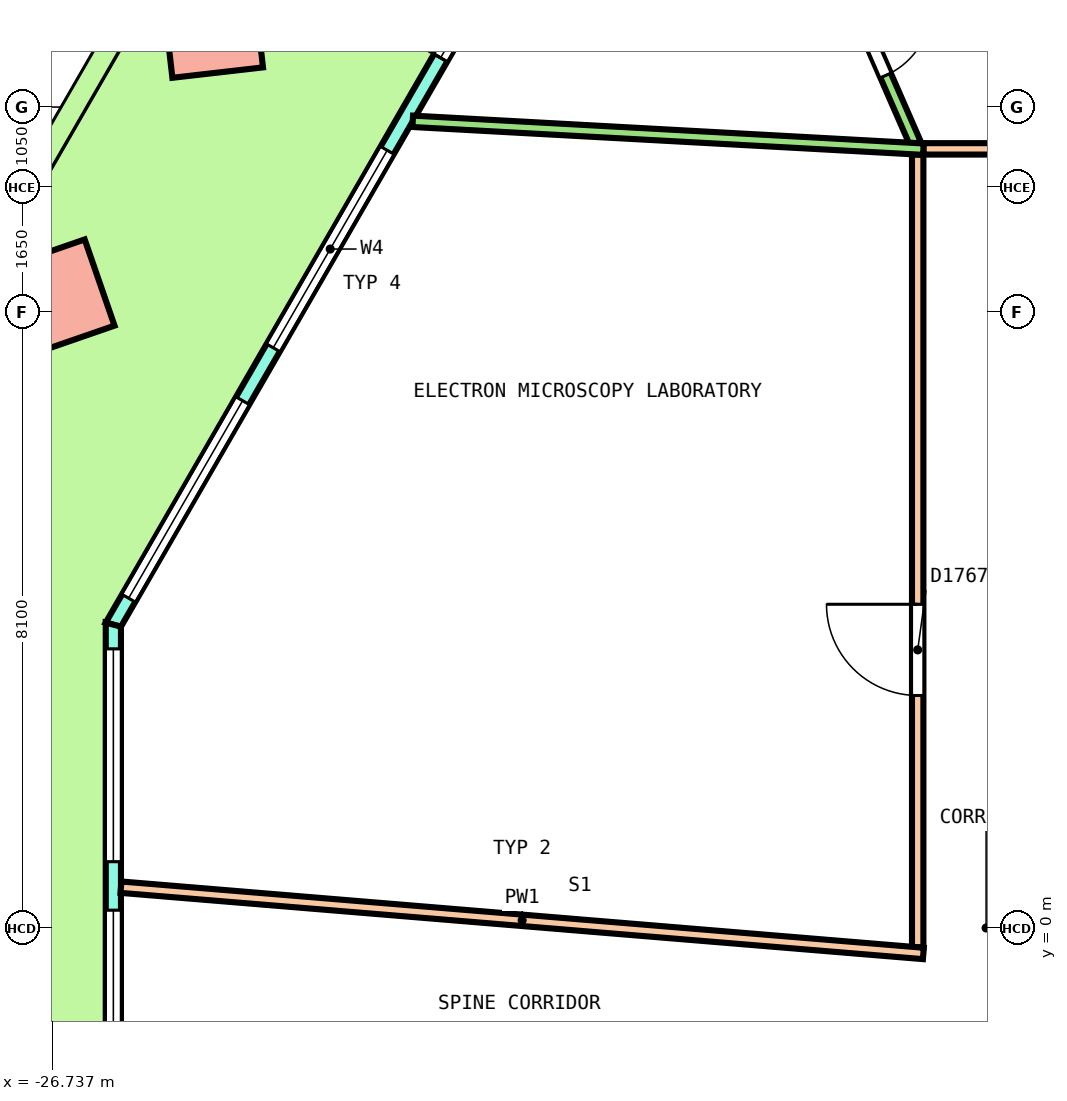
"""IFC4 building model, lengths in metres.
Left out: names, types, materials, properties, quantities, classifications, styles, units other than length and angle.
Written with IfcOpenShell. Run it as: python <this file> out.ifc"""

import sys

from ifc_helpers import new_model, si_unit, direction, frame, frame_2d, origin, origin_2d, place, context, subcontext, project, spatial, polyline, rectangle, outline, extrude, element, fill, save


model = new_model("IFC4")
c1 = context("Model", 3, precision=1e-05, world=origin(), true_north=direction((0.0, 1.0)))
c2 = subcontext(c1, "Body", "Model", "MODEL_VIEW")
j1 = project(units=[si_unit("LENGTHUNIT", "METRE"), si_unit("PLANEANGLEUNIT", "RADIAN")], contexts=[c1])
p1 = place(None, origin())
s1 = spatial("IfcSite", under=j1, at=p1, CompositionType="ELEMENT")
p2 = place(p1, origin())
s2 = spatial("IfcBuilding", under=s1, at=p2, CompositionType="ELEMENT")
p3 = place(p2, frame((0.0, 0.0, 162.8)))
s3 = spatial("IfcBuildingStorey", under=s2, at=p3, CompositionType="ELEMENT", Elevation=162.8)
p4 = place(p3, frame((-24.628, 11.849, 0.0), z_axis=(-0.025365582388, 0.018858497119, 0.999500347332), x_axis=(-0.501191337303, -0.865328971352, 0.0036075963)))
e1 = element("IfcColumn", 1, at=p4, inside=s3, PredefinedType="COLUMN", context=c2, shape_type="SweptSolid", body=[
    extrude(rectangle(XDim=1.2, YDim=1.2, at=origin_2d()), origin(), (0.0, 0.0, 1.0), 4.052),
])
p5 = place(p3, frame((-26.68, 8.295, 0.0), z_axis=(-0.021809609218, 0.025123223878, 0.999446429063), x_axis=(-0.499316957517, -0.86635106376, 0.010881647777)))
e2 = element("IfcColumn", 2, at=p5, inside=s3, PredefinedType="COLUMN", context=c2, shape_type="SweptSolid", body=[
    extrude(rectangle(XDim=1.2, YDim=1.2, at=origin_2d()), origin(), (0.0, 0.0, 1.0), 4.052),
])
p6 = place(p3, frame((-16.422, 20.463, 0.0), z_axis=(0.0, 0.0, 1.0), x_axis=(-0.500001707189, -0.866024418136, 0.0)))
e3 = element("IfcWall", 3, at=p6, inside=s3, PredefinedType="SOLIDWALL", context=c2, shape_type="SweptSolid", body=[
    extrude(outline(polyline([(-0.027, -0.1), (0.977, -0.1), (1.981, -0.1), (2.985, -0.1), (3.989, -0.1), (4.993, -0.1), (5.997, -0.1), (7.0, -0.1), (8.004, -0.1), (9.008, -0.1), (10.012, -0.1), (11.016, -0.1), (12.02, -0.1), (13.024, -0.1), (14.028, -0.1), (15.032, -0.1), (16.036, -0.1), (17.04, -0.1), (18.043, -0.1), (19.047, -0.1), (18.994, 0.1), (17.995, 0.1), (16.997, 0.1), (15.999, 0.1), (15.001, 0.1), (14.002, 0.1), (13.004, 0.1), (12.006, 0.1), (11.008, 0.1), (10.009, 0.1), (9.011, 0.1), (8.013, 0.1), (7.015, 0.1), (6.016, 0.1), (5.018, 0.1), (4.02, 0.1), (3.022, 0.1), (2.023, 0.1), (1.025, 0.1), (0.027, 0.1), (-0.027, -0.1)])), origin(), (0.0, 0.0, 1.0), 4.1),
])
p7 = place(p6, frame((0.402, 0.0, 0.1)))
e4 = element("IfcOpeningElement", 4, at=p7, cuts=e3, PredefinedType="OPENING", context=c2, shape_type="SweptSolid", body=[
    extrude(rectangle(XDim=3.0, YDim=2.9, at=frame_2d((1.5, 1.45))), frame((0.0, 0.11, 0.0), z_axis=(0.0, -1.0, 0.0), x_axis=(1.0, 0.0, 0.0)), (0.0, 0.0, 1.0), 0.22),
])
p8 = place(p6, frame((4.206, 0.0, 0.1)))
e5 = element("IfcOpeningElement", 5, at=p8, cuts=e3, PredefinedType="OPENING", context=c2, shape_type="SweptSolid", body=[
    extrude(rectangle(XDim=3.0, YDim=2.9, at=frame_2d((1.5, 1.45))), frame((0.0, 0.11, 0.0), z_axis=(0.0, -1.0, 0.0), x_axis=(1.0, 0.0, 0.0)), (0.0, 0.0, 1.0), 0.22),
])
p9 = place(p6, frame((8.61, 0.0, 0.0)))
e6 = element("IfcOpeningElement", 6, at=p9, cuts=e3, PredefinedType="OPENING", context=c2, shape_type="SweptSolid", body=[
    extrude(rectangle(XDim=1.8, YDim=2.4, at=frame_2d((0.9, 1.2))), frame((0.0, 0.11, 0.0), z_axis=(0.0, -1.0, 0.0), x_axis=(1.0, 0.0, 0.0)), (0.0, 0.0, 1.0), 0.22),
])
p10 = place(p6, frame((8.61, 0.0, 2.55)))
e7 = element("IfcOpeningElement", 7, at=p10, cuts=e3, PredefinedType="OPENING", context=c2, shape_type="SweptSolid", body=[
    extrude(rectangle(XDim=1.8, YDim=0.45, at=frame_2d((0.9, 0.225))), frame((0.0, 0.11, 0.0), z_axis=(0.0, -1.0, 0.0), x_axis=(1.0, 0.0, 0.0)), (0.0, 0.0, 1.0), 0.22),
])
p11 = place(p6, frame((11.814, 0.0, 0.1)))
e8 = element("IfcOpeningElement", 8, at=p11, cuts=e3, PredefinedType="OPENING", context=c2, shape_type="SweptSolid", body=[
    extrude(rectangle(XDim=3.0, YDim=2.9, at=frame_2d((1.5, 1.45))), frame((0.0, 0.11, 0.0), z_axis=(0.0, -1.0, 0.0), x_axis=(1.0, 0.0, 0.0)), (0.0, 0.0, 1.0), 0.22),
])
p12 = place(p6, frame((15.618, 0.0, 0.1)))
e9 = element("IfcOpeningElement", 9, at=p12, cuts=e3, PredefinedType="OPENING", context=c2, shape_type="SweptSolid", body=[
    extrude(rectangle(XDim=3.0, YDim=2.9, at=frame_2d((1.5, 1.45))), frame((0.0, 0.11, 0.0), z_axis=(0.0, -1.0, 0.0), x_axis=(1.0, 0.0, 0.0)), (0.0, 0.0, 1.0), 0.22),
])
p13 = place(p3, frame((-25.932, 3.99, 0.0), z_axis=(0.0, 0.0, 1.0), x_axis=(0.0, -1.0, 0.0)))
e10 = element("IfcWall", 10, at=p13, inside=s3, PredefinedType="SOLIDWALL", context=c2, shape_type="SweptSolid", body=[
    extrude(outline(polyline([(-0.027, -0.1), (1.128, -0.1), (2.283, -0.1), (3.438, -0.1), (4.592, -0.1), (5.747, -0.1), (6.902, -0.1), (6.848, 0.1), (5.711, 0.1), (4.574, 0.1), (3.438, 0.1), (2.301, 0.1), (1.164, 0.1), (0.027, 0.1), (-0.027, -0.1)])), origin(), (0.0, 0.0, 1.0), 4.1),
])
p14 = place(p13, frame((0.319, 0.0, 0.1)))
e11 = element("IfcOpeningElement", 11, at=p14, cuts=e10, PredefinedType="OPENING", context=c2, shape_type="SweptSolid", body=[
    extrude(rectangle(XDim=2.8, YDim=2.9, at=frame_2d((1.4, 1.45))), frame((0.0, 0.11, 0.0), z_axis=(0.0, -1.0, 0.0), x_axis=(1.0, 0.0, 0.0)), (0.0, 0.0, 1.0), 0.22),
])
p15 = place(p13, frame((3.756, 0.0, 0.1)))
e12 = element("IfcOpeningElement", 12, at=p15, cuts=e10, PredefinedType="OPENING", context=c2, shape_type="SweptSolid", body=[
    extrude(rectangle(XDim=2.8, YDim=2.9, at=frame_2d((1.4, 1.45))), frame((0.0, 0.11, 0.0), z_axis=(0.0, -1.0, 0.0), x_axis=(1.0, 0.0, 0.0)), (0.0, 0.0, 1.0), 0.22),
])
p16 = place(p3, frame((-15.275, 10.25, 0.0), z_axis=(0.0, 0.0, 1.0), x_axis=(1.0, 0.0, 0.0)))
e13 = element("IfcWall", 13, at=p16, inside=s3, PredefinedType="PARTITIONING", context=c2, shape_type="SweptSolid", body=[
    extrude(rectangle(XDim=30.55, YDim=0.15, at=frame_2d((15.275, 0.0))), origin(), (0.0, 0.0, 1.0), 3.05),
])
p17 = place(p16, frame((26.909, 0.0, 0.0)))
e14 = element("IfcOpeningElement", 14, at=p17, cuts=e13, PredefinedType="OPENING", context=c2, shape_type="SweptSolid", body=[
    extrude(rectangle(XDim=1.0, YDim=2.1, at=frame_2d((0.5, 1.05))), frame((0.0, 0.085, 0.0), z_axis=(0.0, -1.0, 0.0), x_axis=(1.0, 0.0, 0.0)), (0.0, 0.0, 1.0), 0.17),
])
p18 = place(p16, frame((14.675, 0.0, 0.0)))
e15 = element("IfcOpeningElement", 15, at=p18, cuts=e13, PredefinedType="OPENING", context=c2, shape_type="SweptSolid", body=[
    extrude(rectangle(XDim=1.2, YDim=2.1, at=frame_2d((0.6, 1.05))), frame((0.0, 0.085, 0.0), z_axis=(0.0, -1.0, 0.0), x_axis=(1.0, 0.0, 0.0)), (0.0, 0.0, 1.0), 0.17),
])
p19 = place(p16, frame((2.326, 0.0, 0.0)))
e16 = element("IfcOpeningElement", 16, at=p19, cuts=e13, PredefinedType="OPENING", context=c2, shape_type="SweptSolid", body=[
    extrude(rectangle(XDim=1.0, YDim=2.1, at=frame_2d((0.5, 1.05))), frame((0.0, 0.085, 0.0), z_axis=(0.0, -1.0, 0.0), x_axis=(1.0, 0.0, 0.0)), (0.0, 0.0, 1.0), 0.17),
])
p20 = place(p3, frame((-15.35, -0.254, 0.0), z_axis=(0.0, 0.0, 1.0), x_axis=(0.0, 1.0, 0.0)))
e17 = element("IfcWall", 17, at=p20, inside=s3, PredefinedType="PARTITIONING", context=c2, shape_type="SweptSolid", body=[
    extrude(rectangle(XDim=10.429, YDim=0.15, at=frame_2d((5.214, 0.0))), origin(), (0.0, 0.0, 1.0), 3.05),
])
p21 = place(p20, frame((3.312, 0.0, 0.0)))
e18 = element("IfcOpeningElement", 18, at=p21, cuts=e17, PredefinedType="OPENING", context=c2, shape_type="SweptSolid", body=[
    extrude(rectangle(XDim=1.2, YDim=2.1, at=frame_2d((0.6, 1.05))), frame((0.0, 0.085, 0.0), z_axis=(0.0, -1.0, 0.0), x_axis=(1.0, 0.0, 0.0)), (0.0, 0.0, 1.0), 0.17),
])
p22 = place(p3, frame((-25.832, 0.537, 0.0), z_axis=(0.0, 0.0, 1.0), x_axis=(0.99660715742, -0.082305369083, 0.0)))
e19 = element("IfcWall", 19, at=p22, inside=s3, PredefinedType="PARTITIONING", context=c2, shape_type="SweptSolid", body=[
    extrude(rectangle(XDim=10.593, YDim=0.15, at=frame_2d((5.296, 0.0))), origin(), (0.0, 0.0, 1.0), 3.05),
])
p23 = place(p3, frame((-18.303, 17.004, 0.0), z_axis=(0.0, 0.0, 1.0), x_axis=(0.400595913262, -0.916254830425, 0.0)))
e20 = element("IfcWall", 20, at=p23, inside=s3, PredefinedType="PARTITIONING", context=c2, shape_type="SweptSolid", body=[
    extrude(rectangle(XDim=7.297, YDim=0.15, at=frame_2d((3.648, 0.0))), origin(), (0.0, 0.0, 1.0), 3.05),
])
p24 = place(p23, frame((5.318, 0.0, 0.0)))
e21 = element("IfcOpeningElement", 21, at=p24, cuts=e20, PredefinedType="OPENING", context=c2, shape_type="SweptSolid", body=[
    extrude(rectangle(XDim=1.0, YDim=2.1, at=frame_2d((0.5, 1.05))), frame((0.0, 0.085, 0.0), z_axis=(0.0, -1.0, 0.0), x_axis=(1.0, 0.0, 0.0)), (0.0, 0.0, 1.0), 0.17),
])
p25 = place(p3, frame((-21.993, 10.613, 0.0), z_axis=(0.0, 0.0, 1.0), x_axis=(0.998513698016, -0.054501329109, 0.0)))
e22 = element("IfcWall", 22, at=p25, inside=s3, PredefinedType="PARTITIONING", context=c2, shape_type="SweptSolid", body=[
    extrude(rectangle(XDim=6.728, YDim=0.15, at=frame_2d((3.364, 0.0))), origin(), (0.0, 0.0, 1.0), 3.05),
])
p26 = place(p9, origin())
e23 = element("IfcDoor", 23, at=p26, inside=s3, OperationType="DOUBLE_DOOR_SINGLE_SWING", PredefinedType="DOOR", context=c2, shape_type="SweptSolid", body=[
    extrude(rectangle(XDim=1.8, YDim=2.4, at=frame_2d((0.9, 1.2))), frame((0.0, 0.025, 0.0), z_axis=(0.0, -1.0, 0.0), x_axis=(1.0, 0.0, 0.0)), (0.0, 0.0, 1.0), 0.05),
])
fill(e6, e23)
p27 = place(p10, origin())
e24 = element("IfcWindow", 24, at=p27, inside=s3, PartitioningType="SINGLE_PANEL", PredefinedType="WINDOW", context=c2, shape_type="SweptSolid", body=[
    extrude(rectangle(XDim=1.8, YDim=0.45, at=frame_2d((0.9, 0.225))), frame((0.0, 0.03, 0.0), z_axis=(0.0, -1.0, 0.0), x_axis=(1.0, 0.0, 0.0)), (0.0, 0.0, 1.0), 0.06),
])
fill(e7, e24)
p28 = place(p11, origin())
e25 = element("IfcWindow", 25, at=p28, inside=s3, PartitioningType="SINGLE_PANEL", PredefinedType="WINDOW", context=c2, shape_type="SweptSolid", body=[
    extrude(rectangle(XDim=3.0, YDim=2.9, at=frame_2d((1.5, 1.45))), frame((0.0, 0.03, 0.0), z_axis=(0.0, -1.0, 0.0), x_axis=(1.0, 0.0, 0.0)), (0.0, 0.0, 1.0), 0.06),
])
fill(e8, e25)
p29 = place(p12, origin())
e26 = element("IfcWindow", 26, at=p29, inside=s3, PartitioningType="SINGLE_PANEL", PredefinedType="WINDOW", context=c2, shape_type="SweptSolid", body=[
    extrude(rectangle(XDim=3.0, YDim=2.9, at=frame_2d((1.5, 1.45))), frame((0.0, 0.03, 0.0), z_axis=(0.0, -1.0, 0.0), x_axis=(1.0, 0.0, 0.0)), (0.0, 0.0, 1.0), 0.06),
])
fill(e9, e26)
p30 = place(p14, origin())
e27 = element("IfcWindow", 27, at=p30, inside=s3, PartitioningType="SINGLE_PANEL", PredefinedType="WINDOW", context=c2, shape_type="SweptSolid", body=[
    extrude(rectangle(XDim=2.8, YDim=2.9, at=frame_2d((1.4, 1.45))), frame((0.0, 0.03, 0.0), z_axis=(0.0, -1.0, 0.0), x_axis=(1.0, 0.0, 0.0)), (0.0, 0.0, 1.0), 0.06),
])
fill(e11, e27)
p31 = place(p15, origin())
e28 = element("IfcWindow", 28, at=p31, inside=s3, PartitioningType="SINGLE_PANEL", PredefinedType="WINDOW", context=c2, shape_type="SweptSolid", body=[
    extrude(rectangle(XDim=2.8, YDim=2.9, at=frame_2d((1.4, 1.45))), frame((0.0, 0.03, 0.0), z_axis=(0.0, -1.0, 0.0), x_axis=(1.0, 0.0, 0.0)), (0.0, 0.0, 1.0), 0.06),
])
fill(e12, e28)
p32 = place(p24, origin())
e29 = element("IfcDoor", 29, at=p32, inside=s3, OperationType="SINGLE_SWING_RIGHT", PredefinedType="DOOR", context=c2, shape_type="SweptSolid", body=[
    extrude(rectangle(XDim=1.0, YDim=2.1, at=frame_2d((0.5, 1.05))), frame((0.0, 0.025, 0.0), z_axis=(0.0, -1.0, 0.0), x_axis=(1.0, 0.0, 0.0)), (0.0, 0.0, 1.0), 0.05),
])
fill(e21, e29)
p33 = place(p21, origin())
e30 = element("IfcDoor", 30, at=p33, inside=s3, OperationType="DOUBLE_DOOR_SINGLE_SWING", PredefinedType="DOOR", context=c2, shape_type="SweptSolid", body=[
    extrude(rectangle(XDim=1.2, YDim=2.1, at=frame_2d((0.6, 1.05))), frame((0.0, 0.025, 0.0), z_axis=(0.0, -1.0, 0.0), x_axis=(1.0, 0.0, 0.0)), (0.0, 0.0, 1.0), 0.05),
])
fill(e18, e30)
save(model, sys.argv[1])
